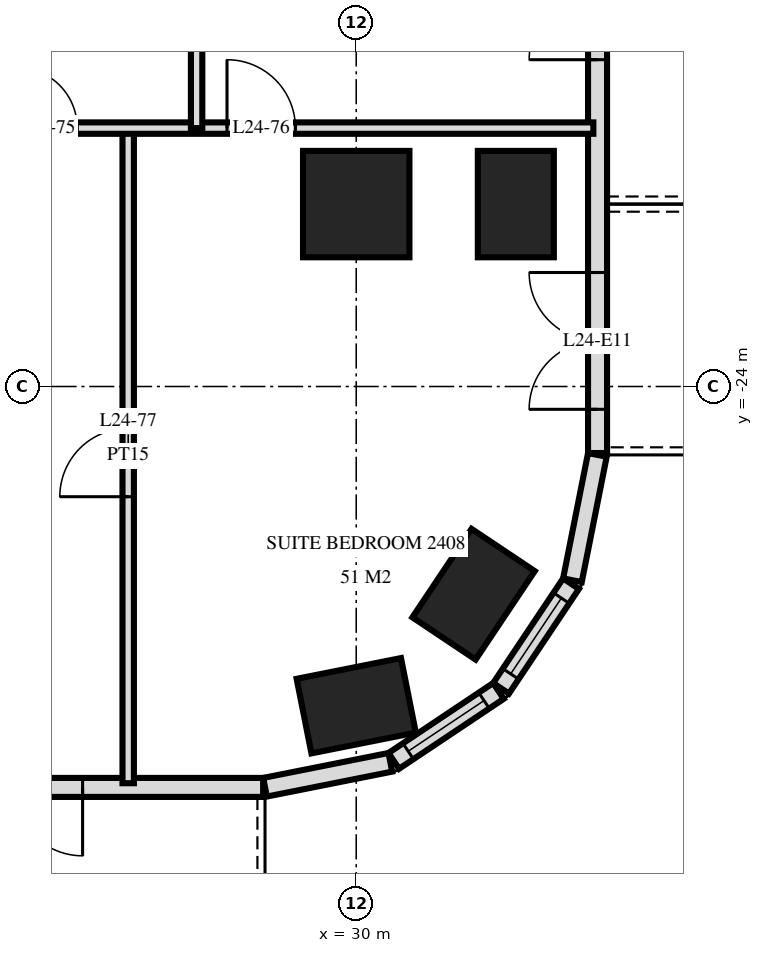
"""IFC4 building model, lengths in metres.
Left out: names, types, materials, properties, quantities, classifications, styles, units other than length and angle.
Written with IfcOpenShell. Run it as: python <this file> out.ifc"""

import sys

from ifc_helpers import new_model, si_unit, direction, frame, frame_2d, origin, origin_2d, place, context, subcontext, project, spatial, rectangle, extrude, element, fill, save


model = new_model("IFC4")
c1 = context("Model", 3, precision=1e-05, world=origin(), true_north=direction((0.0, 1.0)))
c2 = subcontext(c1, "Body", "Model", "MODEL_VIEW")
j1 = project(units=[si_unit("LENGTHUNIT", "METRE"), si_unit("PLANEANGLEUNIT", "RADIAN")], contexts=[c1])
p1 = place(None, origin())
s1 = spatial("IfcSite", under=j1, at=p1, CompositionType="ELEMENT")
p2 = place(p1, origin())
s2 = spatial("IfcBuilding", under=s1, at=p2, CompositionType="ELEMENT")
p3 = place(p2, frame((0.0, 0.0, 96.0)))
s3 = spatial("IfcBuildingStorey", under=s2, at=p3, CompositionType="ELEMENT", Elevation=96.0)
p4 = place(p3, frame((30.0, -28.2, 0.0), z_axis=(0.0, 0.0, 1.0), x_axis=(0.980792089743, 0.195056086032, 0.0)))
e1 = element("IfcColumn", 1, at=p4, inside=s3, PredefinedType="COLUMN", context=c2, shape_type="SweptSolid", body=[
    extrude(rectangle(XDim=1.4, YDim=1.0, at=origin_2d()), origin(), (0.0, 0.0, 1.0), 3.6),
])
p5 = place(p3, frame((30.0, -21.6, 0.0), z_axis=(0.0, 0.0, 1.0), x_axis=(1.0, 0.0, 0.0)))
e2 = element("IfcColumn", 2, at=p5, inside=s3, PredefinedType="COLUMN", context=c2, shape_type="SweptSolid", body=[
    extrude(rectangle(XDim=1.4, YDim=1.4, at=origin_2d()), origin(), (0.0, 0.0, 1.0), 3.6),
])
for number, where, z_axis, x_axis in (
    (3, (31.544, -26.733, 0.0), (0.0, 0.0, 1.0), (0.556, 0.831, 0.0)),
    (4, (32.1, -21.6, 0.0), (0.0, 0.0, 1.0), (0.0, 1.0, 0.0)),
):
    element("IfcColumn", number, at=place(p3, frame(where, z_axis=z_axis, x_axis=x_axis)), inside=s3, PredefinedType="COLUMN", context=c2, shape_type="SweptSolid", body=[
        extrude(rectangle(XDim=1.4, YDim=1.0, at=origin_2d()), origin(), (0.0, 0.0, 1.0), 3.6),
    ])
p6 = place(p3, frame((-28.775, -29.275, 0.0), z_axis=(0.0, 0.0, 1.0), x_axis=(1.0, 0.0, 0.0)))
e5 = element("IfcWall", 5, at=p6, inside=s3, PredefinedType="SOLIDWALL", context=c2, shape_type="SweptSolid", body=[
    extrude(rectangle(XDim=57.551, YDim=0.25, at=frame_2d((28.775, 0.0))), origin(), (0.0, 0.0, 1.0), 3.32),
])
p7 = place(p6, frame((0.575, 0.0, 0.0)))
e6 = element("IfcOpeningElement", 6, at=p7, cuts=e5, PredefinedType="OPENING", context=c2, shape_type="SweptSolid", body=[
    extrude(rectangle(XDim=1.8, YDim=2.4, at=frame_2d((0.9, 1.2))), frame((0.0, 0.135, 0.0), z_axis=(0.0, -1.0, 0.0), x_axis=(1.0, 0.0, 0.0)), (0.0, 0.0, 1.0), 0.27),
])
p8 = place(p6, frame((5.075, 0.0, 0.3)))
e7 = element("IfcOpeningElement", 7, at=p8, cuts=e5, PredefinedType="OPENING", context=c2, shape_type="SweptSolid", body=[
    extrude(rectangle(XDim=2.4, YDim=2.1, at=frame_2d((1.2, 1.05))), frame((0.0, 0.135, 0.0), z_axis=(0.0, -1.0, 0.0), x_axis=(1.0, 0.0, 0.0)), (0.0, 0.0, 1.0), 0.27),
])
p9 = place(p6, frame((8.375, 0.0, 0.0)))
e8 = element("IfcOpeningElement", 8, at=p9, cuts=e5, PredefinedType="OPENING", context=c2, shape_type="SweptSolid", body=[
    extrude(rectangle(XDim=1.8, YDim=2.4, at=frame_2d((0.9, 1.2))), frame((0.0, 0.135, 0.0), z_axis=(0.0, -1.0, 0.0), x_axis=(1.0, 0.0, 0.0)), (0.0, 0.0, 1.0), 0.27),
])
p10 = place(p6, frame((11.375, 0.0, 0.0)))
e9 = element("IfcOpeningElement", 9, at=p10, cuts=e5, PredefinedType="OPENING", context=c2, shape_type="SweptSolid", body=[
    extrude(rectangle(XDim=1.8, YDim=2.4, at=frame_2d((0.9, 1.2))), frame((0.0, 0.135, 0.0), z_axis=(0.0, -1.0, 0.0), x_axis=(1.0, 0.0, 0.0)), (0.0, 0.0, 1.0), 0.27),
])
p11 = place(p6, frame((14.075, 0.0, 0.3)))
e10 = element("IfcOpeningElement", 10, at=p11, cuts=e5, PredefinedType="OPENING", context=c2, shape_type="SweptSolid", body=[
    extrude(rectangle(XDim=2.4, YDim=2.1, at=frame_2d((1.2, 1.05))), frame((0.0, 0.135, 0.0), z_axis=(0.0, -1.0, 0.0), x_axis=(1.0, 0.0, 0.0)), (0.0, 0.0, 1.0), 0.27),
])
p12 = place(p6, frame((17.375, 0.0, 0.0)))
e11 = element("IfcOpeningElement", 11, at=p12, cuts=e5, PredefinedType="OPENING", context=c2, shape_type="SweptSolid", body=[
    extrude(rectangle(XDim=1.8, YDim=2.4, at=frame_2d((0.9, 1.2))), frame((0.0, 0.135, 0.0), z_axis=(0.0, -1.0, 0.0), x_axis=(1.0, 0.0, 0.0)), (0.0, 0.0, 1.0), 0.27),
])
p13 = place(p6, frame((20.075, 0.0, 0.3)))
e12 = element("IfcOpeningElement", 12, at=p13, cuts=e5, PredefinedType="OPENING", context=c2, shape_type="SweptSolid", body=[
    extrude(rectangle(XDim=2.4, YDim=2.1, at=frame_2d((1.2, 1.05))), frame((0.0, 0.135, 0.0), z_axis=(0.0, -1.0, 0.0), x_axis=(1.0, 0.0, 0.0)), (0.0, 0.0, 1.0), 0.27),
])
p14 = place(p6, frame((23.075, 0.0, 0.3)))
e13 = element("IfcOpeningElement", 13, at=p14, cuts=e5, PredefinedType="OPENING", context=c2, shape_type="SweptSolid", body=[
    extrude(rectangle(XDim=2.4, YDim=2.1, at=frame_2d((1.2, 1.05))), frame((0.0, 0.135, 0.0), z_axis=(0.0, -1.0, 0.0), x_axis=(1.0, 0.0, 0.0)), (0.0, 0.0, 1.0), 0.27),
])
p15 = place(p6, frame((26.375, 0.0, 0.0)))
e14 = element("IfcOpeningElement", 14, at=p15, cuts=e5, PredefinedType="OPENING", context=c2, shape_type="SweptSolid", body=[
    extrude(rectangle(XDim=1.8, YDim=2.4, at=frame_2d((0.9, 1.2))), frame((0.0, 0.135, 0.0), z_axis=(0.0, -1.0, 0.0), x_axis=(1.0, 0.0, 0.0)), (0.0, 0.0, 1.0), 0.27),
])
p16 = place(p6, frame((29.375, 0.0, 0.0)))
e15 = element("IfcOpeningElement", 15, at=p16, cuts=e5, PredefinedType="OPENING", context=c2, shape_type="SweptSolid", body=[
    extrude(rectangle(XDim=1.8, YDim=2.4, at=frame_2d((0.9, 1.2))), frame((0.0, 0.135, 0.0), z_axis=(0.0, -1.0, 0.0), x_axis=(1.0, 0.0, 0.0)), (0.0, 0.0, 1.0), 0.27),
])
p17 = place(p6, frame((32.075, 0.0, 0.3)))
e16 = element("IfcOpeningElement", 16, at=p17, cuts=e5, PredefinedType="OPENING", context=c2, shape_type="SweptSolid", body=[
    extrude(rectangle(XDim=2.4, YDim=2.1, at=frame_2d((1.2, 1.05))), frame((0.0, 0.135, 0.0), z_axis=(0.0, -1.0, 0.0), x_axis=(1.0, 0.0, 0.0)), (0.0, 0.0, 1.0), 0.27),
])
p18 = place(p6, frame((35.375, 0.0, 0.0)))
e17 = element("IfcOpeningElement", 17, at=p18, cuts=e5, PredefinedType="OPENING", context=c2, shape_type="SweptSolid", body=[
    extrude(rectangle(XDim=1.8, YDim=2.4, at=frame_2d((0.9, 1.2))), frame((0.0, 0.135, 0.0), z_axis=(0.0, -1.0, 0.0), x_axis=(1.0, 0.0, 0.0)), (0.0, 0.0, 1.0), 0.27),
])
p19 = place(p6, frame((38.075, 0.0, 0.3)))
e18 = element("IfcOpeningElement", 18, at=p19, cuts=e5, PredefinedType="OPENING", context=c2, shape_type="SweptSolid", body=[
    extrude(rectangle(XDim=2.4, YDim=2.1, at=frame_2d((1.2, 1.05))), frame((0.0, 0.135, 0.0), z_axis=(0.0, -1.0, 0.0), x_axis=(1.0, 0.0, 0.0)), (0.0, 0.0, 1.0), 0.27),
])
p20 = place(p6, frame((41.075, 0.0, 0.3)))
e19 = element("IfcOpeningElement", 19, at=p20, cuts=e5, PredefinedType="OPENING", context=c2, shape_type="SweptSolid", body=[
    extrude(rectangle(XDim=2.4, YDim=2.1, at=frame_2d((1.2, 1.05))), frame((0.0, 0.135, 0.0), z_axis=(0.0, -1.0, 0.0), x_axis=(1.0, 0.0, 0.0)), (0.0, 0.0, 1.0), 0.27),
])
p21 = place(p6, frame((44.375, 0.0, 0.0)))
e20 = element("IfcOpeningElement", 20, at=p21, cuts=e5, PredefinedType="OPENING", context=c2, shape_type="SweptSolid", body=[
    extrude(rectangle(XDim=1.8, YDim=2.4, at=frame_2d((0.9, 1.2))), frame((0.0, 0.135, 0.0), z_axis=(0.0, -1.0, 0.0), x_axis=(1.0, 0.0, 0.0)), (0.0, 0.0, 1.0), 0.27),
])
p22 = place(p6, frame((47.075, 0.0, 0.3)))
e21 = element("IfcOpeningElement", 21, at=p22, cuts=e5, PredefinedType="OPENING", context=c2, shape_type="SweptSolid", body=[
    extrude(rectangle(XDim=2.4, YDim=2.1, at=frame_2d((1.2, 1.05))), frame((0.0, 0.135, 0.0), z_axis=(0.0, -1.0, 0.0), x_axis=(1.0, 0.0, 0.0)), (0.0, 0.0, 1.0), 0.27),
])
p23 = place(p6, frame((50.375, 0.0, 0.0)))
e22 = element("IfcOpeningElement", 22, at=p23, cuts=e5, PredefinedType="OPENING", context=c2, shape_type="SweptSolid", body=[
    extrude(rectangle(XDim=1.8, YDim=2.4, at=frame_2d((0.9, 1.2))), frame((0.0, 0.135, 0.0), z_axis=(0.0, -1.0, 0.0), x_axis=(1.0, 0.0, 0.0)), (0.0, 0.0, 1.0), 0.27),
])
p24 = place(p6, frame((53.375, 0.0, 0.0)))
e23 = element("IfcOpeningElement", 23, at=p24, cuts=e5, PredefinedType="OPENING", context=c2, shape_type="SweptSolid", body=[
    extrude(rectangle(XDim=1.8, YDim=2.4, at=frame_2d((0.9, 1.2))), frame((0.0, 0.135, 0.0), z_axis=(0.0, -1.0, 0.0), x_axis=(1.0, 0.0, 0.0)), (0.0, 0.0, 1.0), 0.27),
])
p25 = place(p3, frame((28.8, -29.273, 0.0), z_axis=(0.0, 0.0, 1.0), x_axis=(0.980775640221, 0.19513878023, 0.0)))
e24 = element("IfcWall", 24, at=p25, inside=s3, PredefinedType="SOLIDWALL", context=c2, shape_type="SweptSolid", body=[
    extrude(rectangle(XDim=1.681, YDim=0.25, at=frame_2d((0.841, 0.0))), origin(), (0.0, 0.0, 1.0), 3.32),
])
p26 = place(p3, frame((30.494, -28.926, 0.0), z_axis=(0.0, 0.0, 1.0), x_axis=(0.831482937015, 0.55555029066, 0.0)))
e25 = element("IfcWall", 25, at=p26, inside=s3, PredefinedType="SOLIDWALL", context=c2, shape_type="SweptSolid", body=[
    extrude(rectangle(XDim=1.656, YDim=0.25, at=frame_2d((0.828, 0.0))), origin(), (0.0, 0.0, 1.0), 3.32),
])
p27 = place(p26, frame((0.228, 0.0, 0.9)))
e26 = element("IfcOpeningElement", 26, at=p27, cuts=e25, PredefinedType="OPENING", context=c2, shape_type="SweptSolid", body=[
    extrude(rectangle(XDim=1.2, YDim=1.5, at=frame_2d((0.6, 0.75))), frame((0.0, 0.135, 0.0), z_axis=(0.0, -1.0, 0.0), x_axis=(1.0, 0.0, 0.0)), (0.0, 0.0, 1.0), 0.27),
])
p28 = place(p3, frame((31.906, -27.971, 0.0), z_axis=(0.0, 0.0, 1.0), x_axis=(0.55555029066, 0.831482937015, 0.0)))
e27 = element("IfcWall", 27, at=p28, inside=s3, PredefinedType="SOLIDWALL", context=c2, shape_type="SweptSolid", body=[
    extrude(rectangle(XDim=1.656, YDim=0.25, at=frame_2d((0.828, 0.0))), origin(), (0.0, 0.0, 1.0), 3.32),
])
p29 = place(p28, frame((0.228, 0.0, 0.9)))
e28 = element("IfcOpeningElement", 28, at=p29, cuts=e27, PredefinedType="OPENING", context=c2, shape_type="SweptSolid", body=[
    extrude(rectangle(XDim=1.2, YDim=1.5, at=frame_2d((0.6, 0.75))), frame((0.0, 0.135, 0.0), z_axis=(0.0, -1.0, 0.0), x_axis=(1.0, 0.0, 0.0)), (0.0, 0.0, 1.0), 0.27),
])
p30 = place(p3, frame((32.844, -26.549, 0.0), z_axis=(0.0, 0.0, 1.0), x_axis=(0.195166572128, 0.980770110232, 0.0)))
e29 = element("IfcWall", 29, at=p30, inside=s3, PredefinedType="SOLIDWALL", context=c2, shape_type="SweptSolid", body=[
    extrude(rectangle(XDim=1.681, YDim=0.25, at=frame_2d((0.841, 0.0))), origin(), (0.0, 0.0, 1.0), 3.32),
])
p31 = place(p3, frame((33.175, -24.875, 0.0), z_axis=(0.0, 0.0, 1.0), x_axis=(0.0, 1.0, 0.0)))
e30 = element("IfcWall", 30, at=p31, inside=s3, PredefinedType="SOLIDWALL", context=c2, shape_type="SweptSolid", body=[
    extrude(rectangle(XDim=21.551, YDim=0.25, at=frame_2d((10.775, 0.0))), origin(), (0.0, 0.0, 1.0), 3.32),
])
p32 = place(p31, frame((0.575, 0.0, 0.0)))
e31 = element("IfcOpeningElement", 31, at=p32, cuts=e30, PredefinedType="OPENING", context=c2, shape_type="SweptSolid", body=[
    extrude(rectangle(XDim=1.8, YDim=2.4, at=frame_2d((0.9, 1.2))), frame((0.0, 0.135, 0.0), z_axis=(0.0, -1.0, 0.0), x_axis=(1.0, 0.0, 0.0)), (0.0, 0.0, 1.0), 0.27),
])
p33 = place(p31, frame((5.175, 0.0, 0.0)))
e32 = element("IfcOpeningElement", 32, at=p33, cuts=e30, PredefinedType="OPENING", context=c2, shape_type="SweptSolid", body=[
    extrude(rectangle(XDim=1.8, YDim=2.4, at=frame_2d((0.9, 1.2))), frame((0.0, 0.135, 0.0), z_axis=(0.0, -1.0, 0.0), x_axis=(1.0, 0.0, 0.0)), (0.0, 0.0, 1.0), 0.27),
])
p34 = place(p31, frame((8.275, 0.0, 0.3)))
e33 = element("IfcOpeningElement", 33, at=p34, cuts=e30, PredefinedType="OPENING", context=c2, shape_type="SweptSolid", body=[
    extrude(rectangle(XDim=1.2, YDim=2.1, at=frame_2d((0.6, 1.05))), frame((0.0, 0.135, 0.0), z_axis=(0.0, -1.0, 0.0), x_axis=(1.0, 0.0, 0.0)), (0.0, 0.0, 1.0), 0.27),
])
p35 = place(p31, frame((12.725, 0.0, 0.0)))
e34 = element("IfcOpeningElement", 34, at=p35, cuts=e30, PredefinedType="OPENING", context=c2, shape_type="SweptSolid", body=[
    extrude(rectangle(XDim=1.8, YDim=2.4, at=frame_2d((0.9, 1.2))), frame((0.0, 0.135, 0.0), z_axis=(0.0, -1.0, 0.0), x_axis=(1.0, 0.0, 0.0)), (0.0, 0.0, 1.0), 0.27),
])
p36 = place(p3, frame((27.9, -20.6, 0.0), z_axis=(0.0, 0.0, 1.0), x_axis=(0.0, 1.0, 0.0)))
e35 = element("IfcWall", 35, at=p36, inside=s3, PredefinedType="PARTITIONING", context=c2, shape_type="SweptSolid", body=[
    extrude(rectangle(XDim=3.6, YDim=0.15, at=frame_2d((1.8, 0.0))), origin(), (0.0, 0.0, 1.0), 3.32),
])
p37 = place(p3, frame((27.0, -29.22, 0.0), z_axis=(0.0, 0.0, 1.0), x_axis=(0.0, 1.0, 0.0)))
e36 = element("IfcWall", 36, at=p37, inside=s3, PredefinedType="PARTITIONING", context=c2, shape_type="SweptSolid", body=[
    extrude(rectangle(XDim=8.62, YDim=0.15, at=frame_2d((4.31, 0.0))), origin(), (0.0, 0.0, 1.0), 3.32),
])
p38 = place(p37, frame((3.77, 0.0, 0.0)))
e37 = element("IfcOpeningElement", 37, at=p38, cuts=e36, PredefinedType="OPENING", context=c2, shape_type="SweptSolid", body=[
    extrude(rectangle(XDim=0.9, YDim=2.1, at=frame_2d((0.45, 1.05))), frame((0.0, 0.085, 0.0), z_axis=(0.0, -1.0, 0.0), x_axis=(1.0, 0.0, 0.0)), (0.0, 0.0, 1.0), 0.17),
])
p39 = place(p3, frame((24.9, -20.6, 0.0), z_axis=(0.0, 0.0, 1.0), x_axis=(1.0, 0.0, 0.0)))
e38 = element("IfcWall", 38, at=p39, inside=s3, PredefinedType="PARTITIONING", context=c2, shape_type="SweptSolid", body=[
    extrude(rectangle(XDim=8.22, YDim=0.15, at=frame_2d((4.11, 0.0))), origin(), (0.0, 0.0, 1.0), 3.32),
])
p40 = place(p39, frame((0.63, 0.0, 0.0)))
e39 = element("IfcOpeningElement", 39, at=p40, cuts=e38, PredefinedType="OPENING", context=c2, shape_type="SweptSolid", body=[
    extrude(rectangle(XDim=0.8, YDim=2.1, at=frame_2d((0.4, 1.05))), frame((0.0, 0.085, 0.0), z_axis=(0.0, -1.0, 0.0), x_axis=(1.0, 0.0, 0.0)), (0.0, 0.0, 1.0), 0.17),
])
p41 = place(p39, frame((3.4, 0.0, 0.0)))
e40 = element("IfcOpeningElement", 40, at=p41, cuts=e38, PredefinedType="OPENING", context=c2, shape_type="SweptSolid", body=[
    extrude(rectangle(XDim=0.9, YDim=2.1, at=frame_2d((0.45, 1.05))), frame((0.0, 0.085, 0.0), z_axis=(0.0, -1.0, 0.0), x_axis=(1.0, 0.0, 0.0)), (0.0, 0.0, 1.0), 0.17),
])
p42 = place(p27, origin())
e41 = element("IfcWindow", 41, at=p42, inside=s3, PartitioningType="SINGLE_PANEL", PredefinedType="WINDOW", context=c2, shape_type="SweptSolid", body=[
    extrude(rectangle(XDim=1.2, YDim=1.5, at=frame_2d((0.6, 0.75))), frame((0.0, 0.03, 0.0), z_axis=(0.0, -1.0, 0.0), x_axis=(1.0, 0.0, 0.0)), (0.0, 0.0, 1.0), 0.06),
])
fill(e26, e41)
p43 = place(p29, origin())
e42 = element("IfcWindow", 42, at=p43, inside=s3, PartitioningType="SINGLE_PANEL", PredefinedType="WINDOW", context=c2, shape_type="SweptSolid", body=[
    extrude(rectangle(XDim=1.2, YDim=1.5, at=frame_2d((0.6, 0.75))), frame((0.0, 0.03, 0.0), z_axis=(0.0, -1.0, 0.0), x_axis=(1.0, 0.0, 0.0)), (0.0, 0.0, 1.0), 0.06),
])
fill(e28, e42)
p44 = place(p24, frame((0.9, 0.0, 0.0), z_axis=(0.0, 0.0, 1.0), x_axis=(-1.0, 0.0, 0.0)))
e43 = element("IfcDoor", 43, at=p44, inside=s3, OperationType="DOUBLE_DOOR_SINGLE_SWING", PredefinedType="DOOR", context=c2, shape_type="SweptSolid", body=[
    extrude(rectangle(XDim=1.8, YDim=2.4, at=frame_2d((0.0, 1.2))), frame((0.0, -0.025, 0.0), z_axis=(0.0, 1.0, 0.0), x_axis=(-1.0, 0.0, 0.0)), (0.0, 0.0, 1.0), 0.05),
])
fill(e23, e43)
p45 = place(p32, origin())
e44 = element("IfcDoor", 44, at=p45, inside=s3, OperationType="DOUBLE_DOOR_SINGLE_SWING", PredefinedType="DOOR", context=c2, shape_type="SweptSolid", body=[
    extrude(rectangle(XDim=1.8, YDim=2.4, at=frame_2d((0.9, 1.2))), frame((0.0, 0.025, 0.0), z_axis=(0.0, -1.0, 0.0), x_axis=(1.0, 0.0, 0.0)), (0.0, 0.0, 1.0), 0.05),
])
fill(e31, e44)
p46 = place(p33, origin())
e45 = element("IfcDoor", 45, at=p46, inside=s3, OperationType="DOUBLE_DOOR_SINGLE_SWING", PredefinedType="DOOR", context=c2, shape_type="SweptSolid", body=[
    extrude(rectangle(XDim=1.8, YDim=2.4, at=frame_2d((0.9, 1.2))), frame((0.0, 0.025, 0.0), z_axis=(0.0, -1.0, 0.0), x_axis=(1.0, 0.0, 0.0)), (0.0, 0.0, 1.0), 0.05),
])
fill(e32, e45)
p47 = place(p40, origin())
e46 = element("IfcDoor", 46, at=p47, inside=s3, OperationType="SINGLE_SWING_RIGHT", PredefinedType="DOOR", context=c2, shape_type="SweptSolid", body=[
    extrude(rectangle(XDim=0.8, YDim=2.1, at=frame_2d((0.4, 1.05))), frame((0.0, 0.025, 0.0), z_axis=(0.0, -1.0, 0.0), x_axis=(1.0, 0.0, 0.0)), (0.0, 0.0, 1.0), 0.05),
])
fill(e39, e46)
p48 = place(p41, origin())
e47 = element("IfcDoor", 47, at=p48, inside=s3, OperationType="SINGLE_SWING_RIGHT", PredefinedType="DOOR", context=c2, shape_type="SweptSolid", body=[
    extrude(rectangle(XDim=0.9, YDim=2.1, at=frame_2d((0.45, 1.05))), frame((0.0, 0.025, 0.0), z_axis=(0.0, -1.0, 0.0), x_axis=(1.0, 0.0, 0.0)), (0.0, 0.0, 1.0), 0.05),
])
fill(e40, e47)
p49 = place(p38, origin())
e48 = element("IfcDoor", 48, at=p49, inside=s3, OperationType="SINGLE_SWING_RIGHT", PredefinedType="DOOR", context=c2, shape_type="SweptSolid", body=[
    extrude(rectangle(XDim=0.9, YDim=2.1, at=frame_2d((0.45, 1.05))), frame((0.0, 0.025, 0.0), z_axis=(0.0, -1.0, 0.0), x_axis=(1.0, 0.0, 0.0)), (0.0, 0.0, 1.0), 0.05),
])
fill(e37, e48)
save(model, sys.argv[1])
